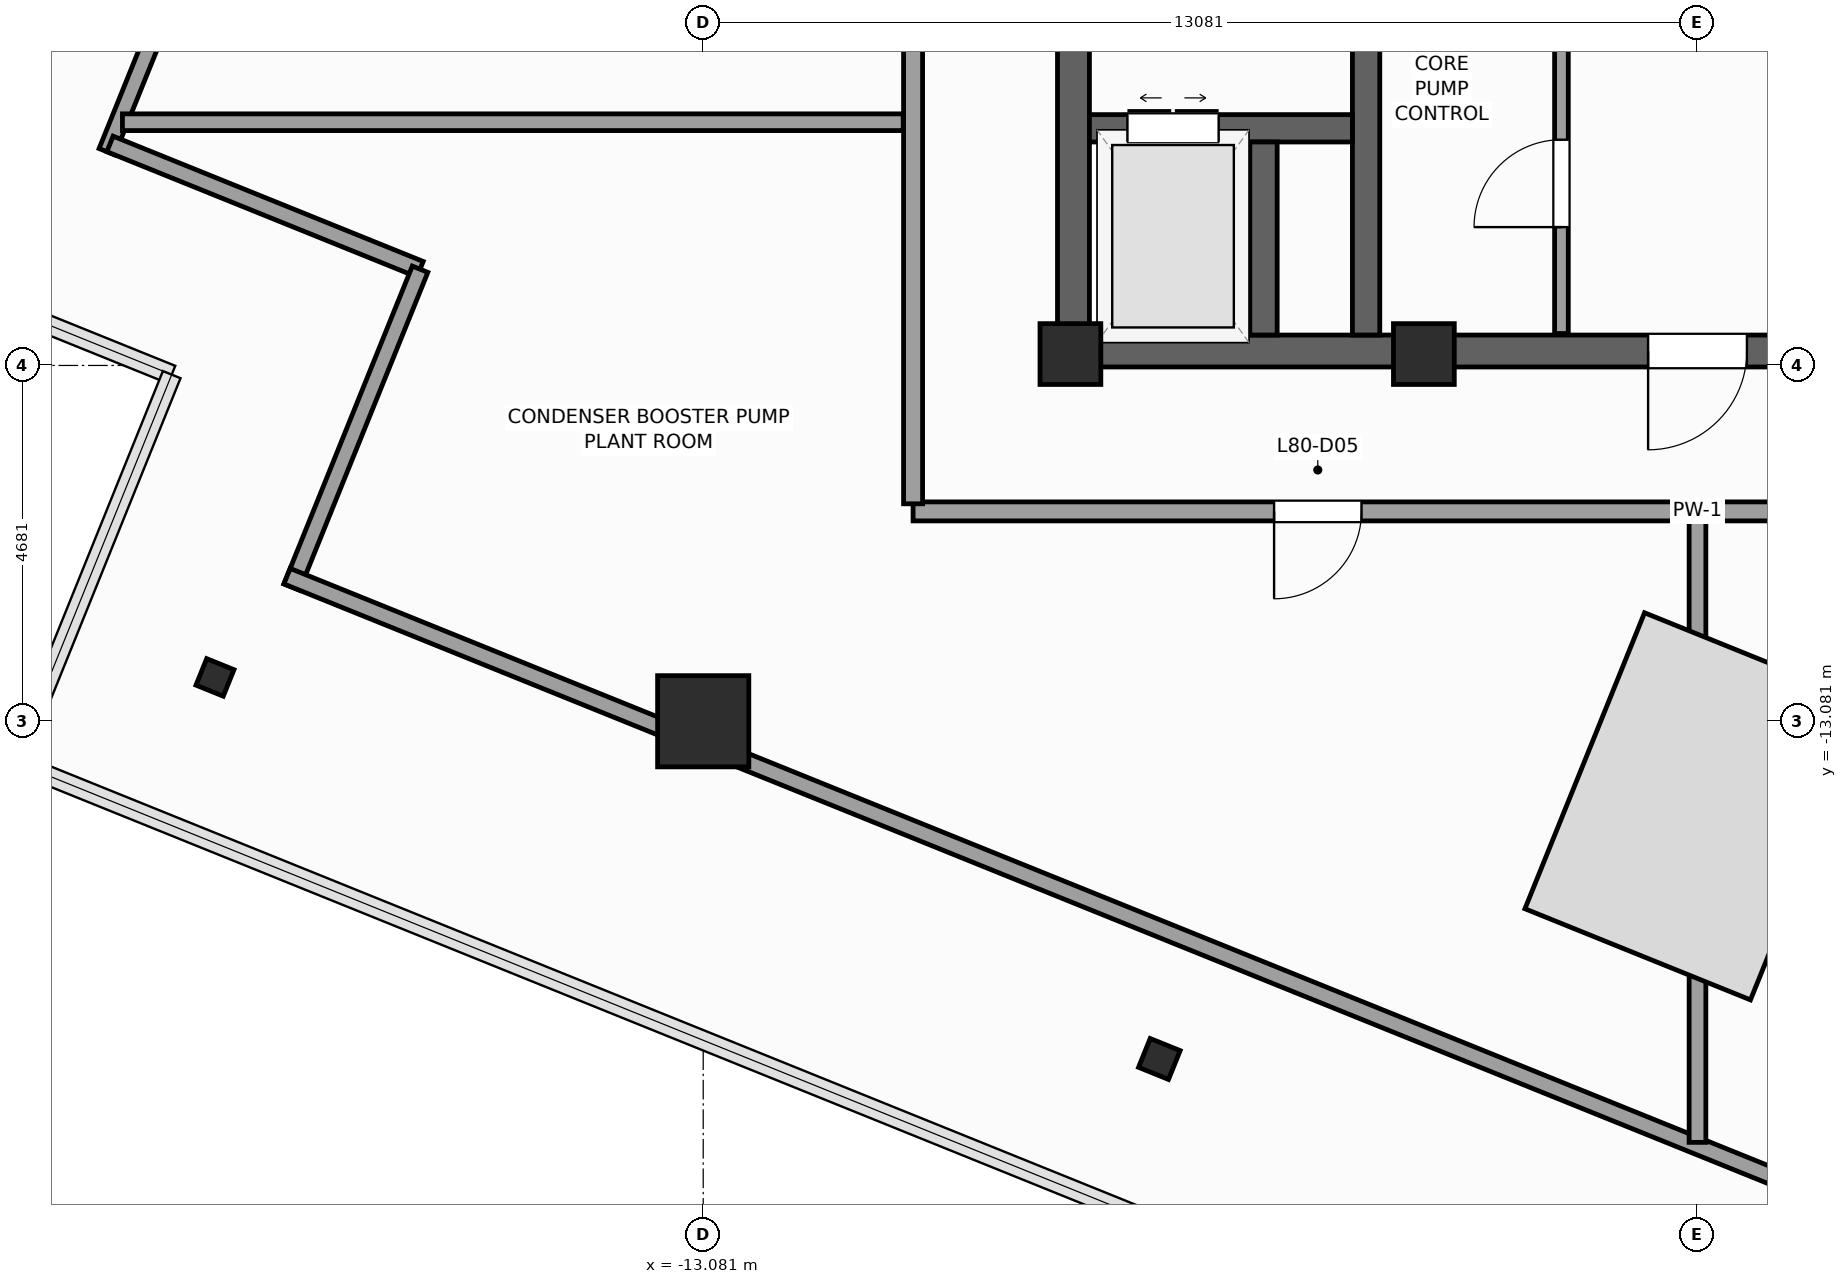
"""IFC4 building model, lengths in metres.
Left out: names, types, materials, properties, quantities, classifications, styles, units other than length and angle.
Written with IfcOpenShell. Run it as: python <this file> out.ifc"""

import sys

from ifc_helpers import new_model, si_unit, direction, frame, frame_2d, origin, origin_2d, place, context, subcontext, project, spatial, rectangle, i_section, extrude, source, transform, mapped, element, fill, save


model = new_model("IFC4")
c1 = context("Model", 3, precision=1e-05, world=origin(), true_north=direction((0.0, 1.0)))
c2 = subcontext(c1, "Body", "Model", "MODEL_VIEW")
j1 = project(units=[si_unit("LENGTHUNIT", "METRE"), si_unit("PLANEANGLEUNIT", "RADIAN")], contexts=[c1])
p1 = place(None, origin())
s1 = spatial("IfcSite", under=j1, at=p1, CompositionType="ELEMENT")
p2 = place(p1, origin())
s2 = spatial("IfcBuilding", under=s1, at=p2, CompositionType="ELEMENT")
p3 = place(p2, frame((0.0, 0.0, 325.6)))
s3 = spatial("IfcBuildingStorey", under=s2, at=p3, CompositionType="ELEMENT", Elevation=325.6)
p4 = place(p3, frame((-8.42, -8.21, 0.0), z_axis=(0.0, 0.0, 1.0), x_axis=(1.0, 0.0, 0.0)))
e1 = element("IfcWall", 1, at=p4, inside=s3, PredefinedType="SHEAR", context=c2, shape_type="SweptSolid", body=[
    extrude(rectangle(XDim=16.84, YDim=0.42, at=frame_2d((8.42, 0.0))), origin(), (0.0, 0.0, 1.0), 4.0),
])
p5 = place(p4, frame((7.77, 0.0, 0.0)))
e2 = element("IfcOpeningElement", 2, at=p5, cuts=e1, PredefinedType="OPENING", context=c2, shape_type="SweptSolid", body=[
    extrude(rectangle(XDim=1.3, YDim=2.2, at=frame_2d((0.65, 1.1))), frame((0.0, 0.22, 0.0), z_axis=(0.0, -1.0, 0.0), x_axis=(1.0, 0.0, 0.0)), (0.0, 0.0, 1.0), 0.44),
])
p6 = place(p3, frame((-8.21, -8.0, 0.0), z_axis=(0.0, 0.0, 1.0), x_axis=(0.0, 1.0, 0.0)))
e3 = element("IfcWall", 3, at=p6, inside=s3, PredefinedType="SHEAR", context=c2, shape_type="SweptSolid", body=[
    extrude(rectangle(XDim=16.0, YDim=0.42, at=frame_2d((8.0, 0.0))), origin(), (0.0, 0.0, 1.0), 4.0),
])
p7 = place(p6, frame((4.69, 0.0, 0.0)))
e4 = element("IfcOpeningElement", 4, at=p7, cuts=e3, PredefinedType="OPENING", context=c2, shape_type="SweptSolid", body=[
    extrude(rectangle(XDim=1.3, YDim=2.2, at=frame_2d((0.65, 1.1))), frame((0.0, 0.22, 0.0), z_axis=(0.0, -1.0, 0.0), x_axis=(1.0, 0.0, 0.0)), (0.0, 0.0, 1.0), 0.44),
])
p8 = place(p3, frame((-4.36, -8.0, 0.0), z_axis=(0.0, 0.0, 1.0), x_axis=(0.0, 1.0, 0.0)))
e5 = element("IfcWall", 5, at=p8, inside=s3, PredefinedType="SHEAR", context=c2, shape_type="SweptSolid", body=[
    extrude(rectangle(XDim=16.0, YDim=0.36, at=frame_2d((8.0, 0.0))), origin(), (0.0, 0.0, 1.0), 4.0),
])
p9 = place(p3, frame((-8.0, -5.28, 0.0), z_axis=(0.0, 0.0, 1.0), x_axis=(1.0, 0.0, 0.0)))
e6 = element("IfcWall", 6, at=p9, inside=s3, PredefinedType="SHEAR", context=c2, shape_type="SweptSolid", body=[
    extrude(rectangle(XDim=3.46, YDim=0.36, at=frame_2d((1.73, 0.0))), origin(), (0.0, 0.0, 1.0), 4.0),
])
p10 = place(p9, frame((0.5, 0.0, 0.0)))
e7 = element("IfcOpeningElement", 7, at=p10, cuts=e6, PredefinedType="OPENING", context=c2, shape_type="SweptSolid", body=[
    extrude(rectangle(XDim=1.2, YDim=2.25, at=frame_2d((0.6, 1.125))), frame((0.0, 0.19, 0.0), z_axis=(0.0, -1.0, 0.0), x_axis=(1.0, 0.0, 0.0)), (0.0, 0.0, 1.0), 0.38),
])
p11 = place(p3, frame((-5.71, -8.0, 0.0), z_axis=(0.0, 0.0, 1.0), x_axis=(0.0, 1.0, 0.0)))
e8 = element("IfcWall", 8, at=p11, inside=s3, PredefinedType="SHEAR", context=c2, shape_type="SweptSolid", body=[
    extrude(rectangle(XDim=2.54, YDim=0.36, at=frame_2d((1.27, 0.0))), origin(), (0.0, 0.0, 1.0), 4.0),
])
m1 = source(origin(), c2, "Body", "SweptSolid", [
    extrude(rectangle(XDim=0.8, YDim=0.8, at=origin_2d()), origin(), (0.0, 0.0, 1.0), 4.0),
])
for number, where, z_axis, x_axis in (
    (9, (-8.25, -8.25, 0.0), (0.0, 0.0, 1.0), (1.0, 0.0, 0.0)),
    (10, (-3.6, -8.25, 0.0), (0.0, 0.0, 1.0), (1.0, 0.0, 0.0)),
):
    element("IfcColumn", number, at=place(p3, frame(where, z_axis=z_axis, x_axis=x_axis)), inside=s3, PredefinedType="PILASTER", context=c2, shape_type="MappedRepresentation", body=[
        mapped(m1, transform((0.0, 0.0, 0.0), scale=1.0)),
    ])
m2 = source(origin(), c2, "Body", "SweptSolid", [
    extrude(rectangle(XDim=1.2, YDim=1.2, at=origin_2d()), origin(), (0.0, 0.0, 1.0), 4.0),
])
p12 = place(p3, frame((-13.081, -13.081, 0.0), z_axis=(0.0, 0.0, 1.0), x_axis=(1.0, 0.0, 0.0)))
e11 = element("IfcColumn", 11, at=p12, inside=s3, PredefinedType="COLUMN", context=c2, shape_type="MappedRepresentation", body=[
    mapped(m2, transform((0.0, 0.0, 0.0), scale=1.0)),
])
m3 = source(origin(), c2, "Body", "SweptSolid", [
    extrude(i_section(OverallWidth=0.376, OverallDepth=0.387, WebThickness=0.02, FlangeThickness=0.032, FilletRadius=0.015, at=origin_2d()), origin(), (0.0, 0.0, 1.0), 4.0),
])
p13 = place(p3, frame((-19.504, -12.504, 0.0), z_axis=(0.0, 0.0, 1.0), x_axis=(0.374606593416, 0.927183854567, 0.0)))
e12 = element("IfcColumn", 12, at=p13, inside=s3, PredefinedType="COLUMN", context=c2, shape_type="MappedRepresentation", body=[
    mapped(m3, transform((0.0, 0.0, 0.0), scale=1.0)),
])
m4 = source(origin(), c2, "Body", "SweptSolid", [
    extrude(i_section(OverallWidth=0.409, OverallDepth=0.425, WebThickness=0.024, FlangeThickness=0.039, FilletRadius=0.015, at=origin_2d()), origin(), (0.0, 0.0, 1.0), 4.0),
])
p14 = place(p3, frame((-7.08, -17.524, 0.0), z_axis=(0.0, 0.0, 1.0), x_axis=(0.374606593416, 0.927183854567, 0.0)))
e13 = element("IfcColumn", 13, at=p14, inside=s3, PredefinedType="COLUMN", context=c2, shape_type="MappedRepresentation", body=[
    mapped(m4, transform((0.0, 0.0, 0.0), scale=1.0)),
])
p15 = place(p3, frame((-1.79, -7.98, 0.0), z_axis=(0.0, 0.0, 1.0), x_axis=(0.0, 1.0, 0.0)))
e14 = element("IfcWall", 14, at=p15, inside=s3, PredefinedType="PARTITIONING", context=c2, shape_type="SweptSolid", body=[
    extrude(rectangle(XDim=12.38, YDim=0.18, at=frame_2d((6.19, 0.0))), origin(), (0.0, 0.0, 1.0), 3.7),
])
p16 = place(p15, frame((1.4, 0.0, 0.0)))
e15 = element("IfcOpeningElement", 15, at=p16, cuts=e14, PredefinedType="OPENING", context=c2, shape_type="SweptSolid", body=[
    extrude(rectangle(XDim=1.15, YDim=2.25, at=frame_2d((0.575, 1.125))), frame((0.0, 0.1, 0.0), z_axis=(0.0, -1.0, 0.0), x_axis=(1.0, 0.0, 0.0)), (0.0, 0.0, 1.0), 0.2),
])
p17 = place(p15, frame((5.6, 0.0, 0.0)))
e16 = element("IfcOpeningElement", 16, at=p17, cuts=e14, PredefinedType="OPENING", context=c2, shape_type="SweptSolid", body=[
    extrude(rectangle(XDim=1.15, YDim=2.25, at=frame_2d((0.575, 1.125))), frame((0.0, 0.1, 0.0), z_axis=(0.0, -1.0, 0.0), x_axis=(1.0, 0.0, 0.0)), (0.0, 0.0, 1.0), 0.2),
])
p18 = place(p15, frame((9.8, 0.0, 0.0)))
e17 = element("IfcOpeningElement", 17, at=p18, cuts=e14, PredefinedType="OPENING", context=c2, shape_type="SweptSolid", body=[
    extrude(rectangle(XDim=1.15, YDim=2.25, at=frame_2d((0.575, 1.125))), frame((0.0, 0.1, 0.0), z_axis=(0.0, -1.0, 0.0), x_axis=(1.0, 0.0, 0.0)), (0.0, 0.0, 1.0), 0.2),
])
p19 = place(p3, frame((-11.172, 18.556, 0.0), z_axis=(0.0, 0.0, 1.0), x_axis=(-0.374611707018, -0.927181788521, 0.0)))
e18 = element("IfcWall", 18, at=p19, inside=s3, PredefinedType="PARTITIONING", context=c2, shape_type="SweptSolid", body=[
    extrude(rectangle(XDim=26.04, YDim=0.22, at=frame_2d((13.02, 0.0))), origin(), (0.0, 0.0, 1.0), 3.05),
])
p20 = place(p3, frame((-20.886, -5.486, 0.0), z_axis=(0.0, 0.0, 1.0), x_axis=(0.927189216671, -0.374593321469, 0.0)))
e19 = element("IfcWall", 19, at=p20, inside=s3, PredefinedType="PARTITIONING", context=c2, shape_type="SweptSolid", body=[
    extrude(rectangle(XDim=4.4, YDim=0.22, at=frame_2d((2.2, 0.0))), origin(), (0.0, 0.0, 1.0), 3.7),
])
p21 = place(p3, frame((-16.806, -7.134, 0.0), z_axis=(0.0, 0.0, 1.0), x_axis=(-0.374599091925, -0.927186885331, 0.0)))
e20 = element("IfcWall", 20, at=p21, inside=s3, PredefinedType="PARTITIONING", context=c2, shape_type="SweptSolid", body=[
    extrude(rectangle(XDim=4.51, YDim=0.22, at=frame_2d((2.255, 0.0))), origin(), (0.0, 0.0, 1.0), 3.7),
])
p22 = place(p3, frame((-18.556, -11.172, 0.0), z_axis=(0.0, 0.0, 1.0), x_axis=(0.927181788521, -0.374611707018, 0.0)))
e21 = element("IfcWall", 21, at=p22, inside=s3, PredefinedType="PARTITIONING", context=c2, shape_type="SweptSolid", body=[
    extrude(rectangle(XDim=26.04, YDim=0.22, at=frame_2d((13.02, 0.0))), origin(), (0.0, 0.0, 1.0), 3.05),
])
p23 = place(p3, frame((-10.32, -10.32, 0.0), z_axis=(0.0, 0.0, 1.0), x_axis=(1.0, 0.0, 0.0)))
e22 = element("IfcWall", 22, at=p23, inside=s3, PredefinedType="PARTITIONING", context=c2, shape_type="SweptSolid", body=[
    extrude(rectangle(XDim=20.64, YDim=0.25, at=frame_2d((10.32, 0.0))), origin(), (0.0, 0.0, 1.0), 3.7),
])
p24 = place(p23, frame((14.74, 0.0, 0.0)))
e23 = element("IfcOpeningElement", 23, at=p24, cuts=e22, PredefinedType="OPENING", context=c2, shape_type="SweptSolid", body=[
    extrude(rectangle(XDim=1.15, YDim=2.25, at=frame_2d((0.575, 1.125))), frame((0.0, 0.135, 0.0), z_axis=(0.0, -1.0, 0.0), x_axis=(1.0, 0.0, 0.0)), (0.0, 0.0, 1.0), 0.27),
])
p25 = place(p23, frame((4.75, 0.0, 0.0)))
e24 = element("IfcOpeningElement", 24, at=p25, cuts=e22, PredefinedType="OPENING", context=c2, shape_type="SweptSolid", body=[
    extrude(rectangle(XDim=1.15, YDim=2.25, at=frame_2d((0.575, 1.125))), frame((0.0, 0.135, 0.0), z_axis=(0.0, -1.0, 0.0), x_axis=(1.0, 0.0, 0.0)), (0.0, 0.0, 1.0), 0.27),
])
p26 = place(p3, frame((-10.32, -10.22, 0.0), z_axis=(0.0, 0.0, 1.0), x_axis=(0.0, 1.0, 0.0)))
e25 = element("IfcWall", 25, at=p26, inside=s3, PredefinedType="PARTITIONING", context=c2, shape_type="SweptSolid", body=[
    extrude(rectangle(XDim=20.44, YDim=0.25, at=frame_2d((10.22, 0.0))), origin(), (0.0, 0.0, 1.0), 3.7),
])
p27 = place(p26, frame((9.645, 0.0, 0.0)))
e26 = element("IfcOpeningElement", 26, at=p27, cuts=e25, PredefinedType="OPENING", context=c2, shape_type="SweptSolid", body=[
    extrude(rectangle(XDim=1.15, YDim=2.25, at=frame_2d((0.575, 1.125))), frame((0.0, 0.135, 0.0), z_axis=(0.0, -1.0, 0.0), x_axis=(1.0, 0.0, 0.0)), (0.0, 0.0, 1.0), 0.27),
])
p28 = place(p3, frame((0.0, -10.45, 0.0), z_axis=(0.0, 0.0, 1.0), x_axis=(0.0, -1.0, 0.0)))
e27 = element("IfcWall", 27, at=p28, inside=s3, PredefinedType="PARTITIONING", context=c2, shape_type="SweptSolid", body=[
    extrude(rectangle(XDim=8.171, YDim=0.22, at=frame_2d((4.085, 0.0))), origin(), (0.0, 0.0, 1.0), 3.7),
])
p29 = place(p3, frame((-10.45, -5.2, 0.0), z_axis=(0.0, 0.0, 1.0), x_axis=(-1.0, 0.0, 0.0)))
e28 = element("IfcWall", 28, at=p29, inside=s3, PredefinedType="PARTITIONING", context=c2, shape_type="SweptSolid", body=[
    extrude(rectangle(XDim=10.272, YDim=0.22, at=frame_2d((5.136, 0.0))), origin(), (0.0, 0.0, 1.0), 3.7),
])
m5 = source(origin(), c2, "Body", "SweptSolid", [
    extrude(rectangle(XDim=1.3, YDim=2.2, at=frame_2d((0.65, 1.1))), frame((0.0, 0.025, 0.0), z_axis=(0.0, -1.0, 0.0), x_axis=(1.0, 0.0, 0.0)), (0.0, 0.0, 1.0), 0.05),
])
p30 = place(p5, frame((1.3, 0.0, 0.0), z_axis=(0.0, 0.0, 1.0), x_axis=(-1.0, 0.0, 0.0)))
e29 = element("IfcDoor", 29, at=p30, inside=s3, OperationType="SINGLE_SWING_LEFT", PredefinedType="DOOR", context=c2, shape_type="MappedRepresentation", body=[
    mapped(m5, transform((0.0, 0.0, 0.0), scale=1.0)),
])
fill(e2, e29)
m6 = source(origin(), c2, "Body", "SweptSolid", [
    extrude(rectangle(XDim=1.2, YDim=2.25, at=frame_2d((0.6, 1.125))), frame((0.0, 0.025, 0.0), z_axis=(0.0, -1.0, 0.0), x_axis=(1.0, 0.0, 0.0)), (0.0, 0.0, 1.0), 0.05),
])
p31 = place(p10, origin())
e30 = element("IfcDoor", 30, at=p31, inside=s3, OperationType="DOUBLE_DOOR_SLIDING", PredefinedType="DOOR", context=c2, shape_type="MappedRepresentation", body=[
    mapped(m6, transform((0.0, 0.0, 0.0), scale=1.0)),
])
fill(e7, e30)
m7 = source(origin(), c2, "Body", "SweptSolid", [
    extrude(rectangle(XDim=1.15, YDim=2.25, at=frame_2d((0.575, 1.125))), frame((0.0, 0.025, 0.0), z_axis=(0.0, -1.0, 0.0), x_axis=(1.0, 0.0, 0.0)), (0.0, 0.0, 1.0), 0.05),
])
p32 = place(p16, origin())
e31 = element("IfcDoor", 31, at=p32, inside=s3, OperationType="SINGLE_SWING_LEFT", PredefinedType="DOOR", context=c2, shape_type="MappedRepresentation", body=[
    mapped(m7, transform((0.0, 0.0, 0.0), scale=1.0)),
])
fill(e15, e31)
p33 = place(p25, frame((1.15, 0.0, 0.0), z_axis=(0.0, 0.0, 1.0), x_axis=(-1.0, 0.0, 0.0)))
e32 = element("IfcDoor", 32, at=p33, inside=s3, OperationType="SINGLE_SWING_LEFT", PredefinedType="DOOR", context=c2, shape_type="MappedRepresentation", body=[
    mapped(m7, transform((0.0, 0.0, 0.0), scale=1.0)),
])
fill(e24, e32)
save(model, sys.argv[1])
